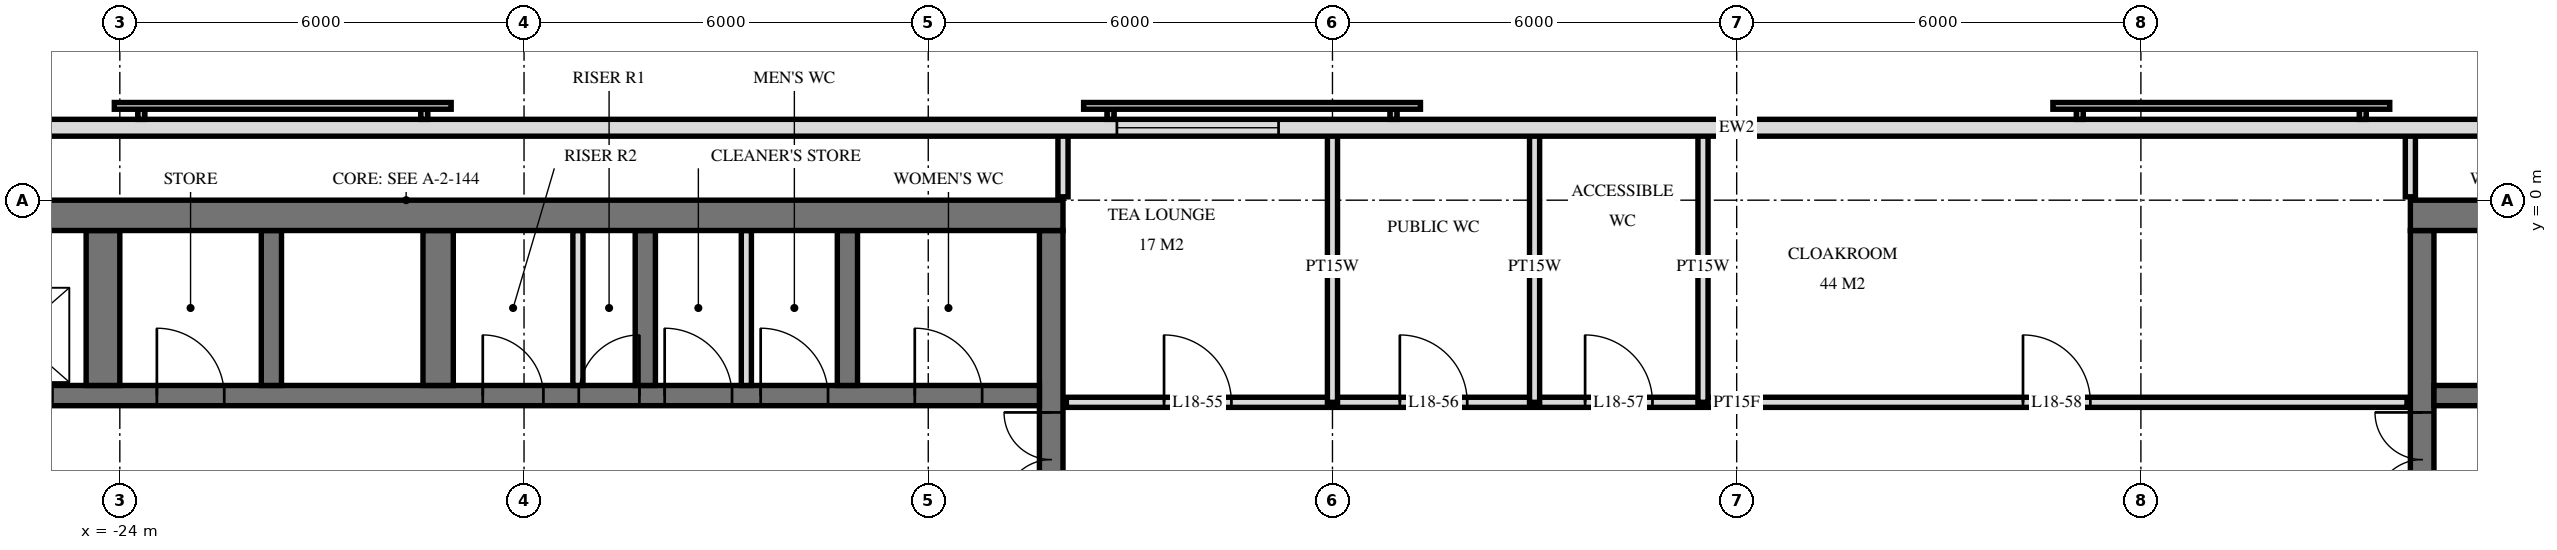
"""IFC4 building model, lengths in metres.
Left out: names, types, materials, properties, quantities, classifications, styles, units other than length and angle.
Written with IfcOpenShell. Run it as: python <this file> out.ifc"""

import sys

from ifc_helpers import new_model, si_unit, direction, frame, frame_2d, origin, place, context, subcontext, project, spatial, rectangle, extrude, element, fill, save


model = new_model("IFC4")
c1 = context("Model", 3, precision=1e-05, world=origin(), true_north=direction((0.0, 1.0)))
c2 = subcontext(c1, "Body", "Model", "MODEL_VIEW")
j1 = project(units=[si_unit("LENGTHUNIT", "METRE"), si_unit("PLANEANGLEUNIT", "RADIAN")], contexts=[c1])
p1 = place(None, origin())
s1 = spatial("IfcSite", under=j1, at=p1, CompositionType="ELEMENT")
p2 = place(p1, origin())
s2 = spatial("IfcBuilding", under=s1, at=p2, CompositionType="ELEMENT")
p3 = place(p2, frame((0.0, 0.0, 74.4)))
s3 = spatial("IfcBuildingStorey", under=s2, at=p3, CompositionType="ELEMENT", Elevation=74.4)
p4 = place(p3, frame((-29.5, -0.225, 0.0), z_axis=(0.0, 0.0, 1.0), x_axis=(1.0, 0.0, 0.0)))
e1 = element("IfcWall", 1, at=p4, inside=s3, PredefinedType="SHEAR", context=c2, shape_type="SweptSolid", body=[
    extrude(rectangle(XDim=19.5, YDim=0.45, at=frame_2d((9.75, 0.0))), origin(), (0.0, 0.0, 1.0), 3.6),
])
p5 = place(p3, frame((-10.175, -14.55, 0.0), z_axis=(0.0, 0.0, 1.0), x_axis=(0.0, 1.0, 0.0)))
e2 = element("IfcWall", 2, at=p5, inside=s3, PredefinedType="SHEAR", context=c2, shape_type="SweptSolid", body=[
    extrude(rectangle(XDim=14.1, YDim=0.35, at=frame_2d((7.05, 0.0))), origin(), (0.0, 0.0, 1.0), 3.6),
])
p6 = place(p5, frame((8.4, 0.0, 0.0)))
e3 = element("IfcOpeningElement", 3, at=p6, cuts=e2, PredefinedType="OPENING", context=c2, shape_type="SweptSolid", body=[
    extrude(rectangle(XDim=1.4, YDim=2.4, at=frame_2d((0.7, 1.2))), frame((0.0, 0.185, 0.0), z_axis=(0.0, -1.0, 0.0), x_axis=(1.0, 0.0, 0.0)), (0.0, 0.0, 1.0), 0.37),
])
p7 = place(p5, frame((10.0, 0.0, 0.0)))
e4 = element("IfcOpeningElement", 4, at=p7, cuts=e2, PredefinedType="OPENING", context=c2, shape_type="SweptSolid", body=[
    extrude(rectangle(XDim=1.4, YDim=2.4, at=frame_2d((0.7, 1.2))), frame((0.0, 0.185, 0.0), z_axis=(0.0, -1.0, 0.0), x_axis=(1.0, 0.0, 0.0)), (0.0, 0.0, 1.0), 0.37),
])
p8 = place(p5, frame((4.0, 0.0, 0.0)))
e5 = element("IfcOpeningElement", 5, at=p8, cuts=e2, PredefinedType="OPENING", context=c2, shape_type="SweptSolid", body=[
    extrude(rectangle(XDim=1.2, YDim=2.1, at=frame_2d((0.6, 1.05))), frame((0.0, 0.185, 0.0), z_axis=(0.0, -1.0, 0.0), x_axis=(1.0, 0.0, 0.0)), (0.0, 0.0, 1.0), 0.37),
])
p9 = place(p3, frame((-29.05, -2.9, 0.0), z_axis=(0.0, 0.0, 1.0), x_axis=(1.0, 0.0, 0.0)))
e6 = element("IfcWall", 6, at=p9, inside=s3, PredefinedType="SHEAR", context=c2, shape_type="SweptSolid", body=[
    extrude(rectangle(XDim=18.7, YDim=0.3, at=frame_2d((9.35, 0.0))), origin(), (0.0, 0.0, 1.0), 3.6),
])
p10 = place(p9, frame((2.95, 0.0, 0.0)))
e7 = element("IfcOpeningElement", 7, at=p10, cuts=e6, PredefinedType="OPENING", context=c2, shape_type="SweptSolid", body=[
    extrude(rectangle(XDim=1.1, YDim=2.1, at=frame_2d((0.55, 1.05))), frame((0.0, 0.16, 0.0), z_axis=(0.0, -1.0, 0.0), x_axis=(1.0, 0.0, 0.0)), (0.0, 0.0, 1.0), 0.32),
])
p11 = place(p9, frame((0.55, 0.0, 0.0)))
e8 = element("IfcOpeningElement", 8, at=p11, cuts=e6, PredefinedType="OPENING", context=c2, shape_type="SweptSolid", body=[
    extrude(rectangle(XDim=1.1, YDim=2.1, at=frame_2d((0.55, 1.05))), frame((0.0, 0.16, 0.0), z_axis=(0.0, -1.0, 0.0), x_axis=(1.0, 0.0, 0.0)), (0.0, 0.0, 1.0), 0.32),
])
p12 = place(p9, frame((11.863, 0.0, 0.0)))
e9 = element("IfcOpeningElement", 9, at=p12, cuts=e6, PredefinedType="OPENING", context=c2, shape_type="SweptSolid", body=[
    extrude(rectangle(XDim=0.9, YDim=2.1, at=frame_2d((0.45, 1.05))), frame((0.0, 0.16, 0.0), z_axis=(0.0, -1.0, 0.0), x_axis=(1.0, 0.0, 0.0)), (0.0, 0.0, 1.0), 0.32),
])
p13 = place(p9, frame((10.438, 0.0, 0.0)))
e10 = element("IfcOpeningElement", 10, at=p13, cuts=e6, PredefinedType="OPENING", context=c2, shape_type="SweptSolid", body=[
    extrude(rectangle(XDim=0.9, YDim=2.1, at=frame_2d((0.45, 1.05))), frame((0.0, 0.16, 0.0), z_axis=(0.0, -1.0, 0.0), x_axis=(1.0, 0.0, 0.0)), (0.0, 0.0, 1.0), 0.32),
])
p14 = place(p9, frame((16.85, 0.0, 0.0)))
e11 = element("IfcOpeningElement", 11, at=p14, cuts=e6, PredefinedType="OPENING", context=c2, shape_type="SweptSolid", body=[
    extrude(rectangle(XDim=1.0, YDim=2.1, at=frame_2d((0.5, 1.05))), frame((0.0, 0.16, 0.0), z_axis=(0.0, -1.0, 0.0), x_axis=(1.0, 0.0, 0.0)), (0.0, 0.0, 1.0), 0.32),
])
p15 = place(p9, frame((14.562, 0.0, 0.0)))
e12 = element("IfcOpeningElement", 12, at=p15, cuts=e6, PredefinedType="OPENING", context=c2, shape_type="SweptSolid", body=[
    extrude(rectangle(XDim=1.0, YDim=2.1, at=frame_2d((0.5, 1.05))), frame((0.0, 0.16, 0.0), z_axis=(0.0, -1.0, 0.0), x_axis=(1.0, 0.0, 0.0)), (0.0, 0.0, 1.0), 0.32),
])
p16 = place(p9, frame((13.137, 0.0, 0.0)))
e13 = element("IfcOpeningElement", 13, at=p16, cuts=e6, PredefinedType="OPENING", context=c2, shape_type="SweptSolid", body=[
    extrude(rectangle(XDim=1.0, YDim=2.1, at=frame_2d((0.5, 1.05))), frame((0.0, 0.16, 0.0), z_axis=(0.0, -1.0, 0.0), x_axis=(1.0, 0.0, 0.0)), (0.0, 0.0, 1.0), 0.32),
])
p17 = place(p9, frame((5.6, 0.0, 0.0)))
e14 = element("IfcOpeningElement", 14, at=p17, cuts=e6, PredefinedType="OPENING", context=c2, shape_type="SweptSolid", body=[
    extrude(rectangle(XDim=1.0, YDim=2.1, at=frame_2d((0.5, 1.05))), frame((0.0, 0.16, 0.0), z_axis=(0.0, -1.0, 0.0), x_axis=(1.0, 0.0, 0.0)), (0.0, 0.0, 1.0), 0.32),
])
for number, where, z_axis, x_axis in (
    (15, (-13.2, -2.75, 0.0), (0.0, 0.0, 1.0), (0.0, 1.0, 0.0)),
    (16, (-16.2, -2.75, 0.0), (0.0, 0.0, 1.0), (0.0, 1.0, 0.0)),
):
    element("IfcWall", number, at=place(p3, frame(where, z_axis=z_axis, x_axis=x_axis)), inside=s3, PredefinedType="SHEAR", context=c2, shape_type="SweptSolid", body=[
        extrude(rectangle(XDim=2.3, YDim=0.3, at=frame_2d((1.15, 0.0))), origin(), (0.0, 0.0, 1.0), 3.6),
    ])
p18 = place(p3, frame((-19.275, -2.75, 0.0), z_axis=(0.0, 0.0, 1.0), x_axis=(0.0, 1.0, 0.0)))
e17 = element("IfcWall", 17, at=p18, inside=s3, PredefinedType="SHEAR", context=c2, shape_type="SweptSolid", body=[
    extrude(rectangle(XDim=2.3, YDim=0.45, at=frame_2d((1.15, 0.0))), origin(), (0.0, 0.0, 1.0), 3.6),
])
p19 = place(p3, frame((-21.75, -2.75, 0.0), z_axis=(0.0, 0.0, 1.0), x_axis=(0.0, 1.0, 0.0)))
e18 = element("IfcWall", 18, at=p19, inside=s3, PredefinedType="SHEAR", context=c2, shape_type="SweptSolid", body=[
    extrude(rectangle(XDim=2.3, YDim=0.3, at=frame_2d((1.15, 0.0))), origin(), (0.0, 0.0, 1.0), 3.6),
])
p20 = place(p3, frame((-24.25, -2.75, 0.0), z_axis=(0.0, 0.0, 1.0), x_axis=(0.0, 1.0, 0.0)))
e19 = element("IfcWall", 19, at=p20, inside=s3, PredefinedType="SHEAR", context=c2, shape_type="SweptSolid", body=[
    extrude(rectangle(XDim=2.3, YDim=0.5, at=frame_2d((1.15, 0.0))), origin(), (0.0, 0.0, 1.0), 3.6),
])
p21 = place(p3, frame((10.0, -0.225, 0.0), z_axis=(0.0, 0.0, 1.0), x_axis=(1.0, 0.0, 0.0)))
e20 = element("IfcWall", 20, at=p21, inside=s3, PredefinedType="SHEAR", context=c2, shape_type="SweptSolid", body=[
    extrude(rectangle(XDim=19.5, YDim=0.45, at=frame_2d((9.75, 0.0))), origin(), (0.0, 0.0, 1.0), 3.6),
])
p22 = place(p3, frame((10.175, -14.55, 0.0), z_axis=(0.0, 0.0, 1.0), x_axis=(0.0, 1.0, 0.0)))
e21 = element("IfcWall", 21, at=p22, inside=s3, PredefinedType="SHEAR", context=c2, shape_type="SweptSolid", body=[
    extrude(rectangle(XDim=14.1, YDim=0.35, at=frame_2d((7.05, 0.0))), origin(), (0.0, 0.0, 1.0), 3.6),
])
p23 = place(p22, frame((8.4, 0.0, 0.0)))
e22 = element("IfcOpeningElement", 22, at=p23, cuts=e21, PredefinedType="OPENING", context=c2, shape_type="SweptSolid", body=[
    extrude(rectangle(XDim=1.4, YDim=2.4, at=frame_2d((0.7, 1.2))), frame((0.0, 0.185, 0.0), z_axis=(0.0, -1.0, 0.0), x_axis=(1.0, 0.0, 0.0)), (0.0, 0.0, 1.0), 0.37),
])
p24 = place(p22, frame((10.0, 0.0, 0.0)))
e23 = element("IfcOpeningElement", 23, at=p24, cuts=e21, PredefinedType="OPENING", context=c2, shape_type="SweptSolid", body=[
    extrude(rectangle(XDim=1.4, YDim=2.4, at=frame_2d((0.7, 1.2))), frame((0.0, 0.185, 0.0), z_axis=(0.0, -1.0, 0.0), x_axis=(1.0, 0.0, 0.0)), (0.0, 0.0, 1.0), 0.37),
])
p25 = place(p22, frame((4.0, 0.0, 0.0)))
e24 = element("IfcOpeningElement", 24, at=p25, cuts=e21, PredefinedType="OPENING", context=c2, shape_type="SweptSolid", body=[
    extrude(rectangle(XDim=1.2, YDim=2.1, at=frame_2d((0.6, 1.05))), frame((0.0, 0.185, 0.0), z_axis=(0.0, -1.0, 0.0), x_axis=(1.0, 0.0, 0.0)), (0.0, 0.0, 1.0), 0.37),
])
p26 = place(p3, frame((10.35, -2.9, 0.0), z_axis=(0.0, 0.0, 1.0), x_axis=(1.0, 0.0, 0.0)))
e25 = element("IfcWall", 25, at=p26, inside=s3, PredefinedType="SHEAR", context=c2, shape_type="SweptSolid", body=[
    extrude(rectangle(XDim=18.7, YDim=0.3, at=frame_2d((9.35, 0.0))), origin(), (0.0, 0.0, 1.0), 3.6),
])
p27 = place(p26, frame((14.65, 0.0, 0.0)))
e26 = element("IfcOpeningElement", 26, at=p27, cuts=e25, PredefinedType="OPENING", context=c2, shape_type="SweptSolid", body=[
    extrude(rectangle(XDim=1.1, YDim=2.1, at=frame_2d((0.55, 1.05))), frame((0.0, 0.16, 0.0), z_axis=(0.0, -1.0, 0.0), x_axis=(1.0, 0.0, 0.0)), (0.0, 0.0, 1.0), 0.32),
])
p28 = place(p26, frame((17.05, 0.0, 0.0)))
e27 = element("IfcOpeningElement", 27, at=p28, cuts=e25, PredefinedType="OPENING", context=c2, shape_type="SweptSolid", body=[
    extrude(rectangle(XDim=1.1, YDim=2.1, at=frame_2d((0.55, 1.05))), frame((0.0, 0.16, 0.0), z_axis=(0.0, -1.0, 0.0), x_axis=(1.0, 0.0, 0.0)), (0.0, 0.0, 1.0), 0.32),
])
p29 = place(p26, frame((5.938, 0.0, 0.0)))
e28 = element("IfcOpeningElement", 28, at=p29, cuts=e25, PredefinedType="OPENING", context=c2, shape_type="SweptSolid", body=[
    extrude(rectangle(XDim=0.9, YDim=2.1, at=frame_2d((0.45, 1.05))), frame((0.0, 0.16, 0.0), z_axis=(0.0, -1.0, 0.0), x_axis=(1.0, 0.0, 0.0)), (0.0, 0.0, 1.0), 0.32),
])
p30 = place(p26, frame((7.363, 0.0, 0.0)))
e29 = element("IfcOpeningElement", 29, at=p30, cuts=e25, PredefinedType="OPENING", context=c2, shape_type="SweptSolid", body=[
    extrude(rectangle(XDim=0.9, YDim=2.1, at=frame_2d((0.45, 1.05))), frame((0.0, 0.16, 0.0), z_axis=(0.0, -1.0, 0.0), x_axis=(1.0, 0.0, 0.0)), (0.0, 0.0, 1.0), 0.32),
])
p31 = place(p26, frame((0.85, 0.0, 0.0)))
e30 = element("IfcOpeningElement", 30, at=p31, cuts=e25, PredefinedType="OPENING", context=c2, shape_type="SweptSolid", body=[
    extrude(rectangle(XDim=1.0, YDim=2.1, at=frame_2d((0.5, 1.05))), frame((0.0, 0.16, 0.0), z_axis=(0.0, -1.0, 0.0), x_axis=(1.0, 0.0, 0.0)), (0.0, 0.0, 1.0), 0.32),
])
p32 = place(p26, frame((3.137, 0.0, 0.0)))
e31 = element("IfcOpeningElement", 31, at=p32, cuts=e25, PredefinedType="OPENING", context=c2, shape_type="SweptSolid", body=[
    extrude(rectangle(XDim=1.0, YDim=2.1, at=frame_2d((0.5, 1.05))), frame((0.0, 0.16, 0.0), z_axis=(0.0, -1.0, 0.0), x_axis=(1.0, 0.0, 0.0)), (0.0, 0.0, 1.0), 0.32),
])
p33 = place(p26, frame((4.562, 0.0, 0.0)))
e32 = element("IfcOpeningElement", 32, at=p33, cuts=e25, PredefinedType="OPENING", context=c2, shape_type="SweptSolid", body=[
    extrude(rectangle(XDim=1.0, YDim=2.1, at=frame_2d((0.5, 1.05))), frame((0.0, 0.16, 0.0), z_axis=(0.0, -1.0, 0.0), x_axis=(1.0, 0.0, 0.0)), (0.0, 0.0, 1.0), 0.32),
])
p34 = place(p26, frame((12.1, 0.0, 0.0)))
e33 = element("IfcOpeningElement", 33, at=p34, cuts=e25, PredefinedType="OPENING", context=c2, shape_type="SweptSolid", body=[
    extrude(rectangle(XDim=1.0, YDim=2.1, at=frame_2d((0.5, 1.05))), frame((0.0, 0.16, 0.0), z_axis=(0.0, -1.0, 0.0), x_axis=(1.0, 0.0, 0.0)), (0.0, 0.0, 1.0), 0.32),
])
p35 = place(p3, frame((28.775, 1.075, 0.0), z_axis=(0.0, 0.0, 1.0), x_axis=(-1.0, 0.0, 0.0)))
e34 = element("IfcWall", 34, at=p35, inside=s3, PredefinedType="SOLIDWALL", context=c2, shape_type="SweptSolid", body=[
    extrude(rectangle(XDim=57.551, YDim=0.25, at=frame_2d((28.775, 0.0))), origin(), (0.0, 0.0, 1.0), 3.32),
])
p36 = place(p35, frame((35.575, 0.0, 0.3)))
e35 = element("IfcOpeningElement", 35, at=p36, cuts=e34, PredefinedType="OPENING", context=c2, shape_type="SweptSolid", body=[
    extrude(rectangle(XDim=2.4, YDim=2.1, at=frame_2d((1.2, 1.05))), frame((0.0, 0.135, 0.0), z_axis=(0.0, -1.0, 0.0), x_axis=(1.0, 0.0, 0.0)), (0.0, 0.0, 1.0), 0.27),
])
for number, where, z_axis, x_axis in (
    (36, (-17.2, -2.75, 0.0), (0.0, 0.0, 1.0), (0.0, 1.0, 0.0)),
    (37, (-14.7, -2.75, 0.0), (0.0, 0.0, 1.0), (0.0, 1.0, 0.0)),
):
    element("IfcWall", number, at=place(p3, frame(where, z_axis=z_axis, x_axis=x_axis)), inside=s3, PredefinedType="PARTITIONING", context=c2, shape_type="SweptSolid", body=[
        extrude(rectangle(XDim=2.3, YDim=0.15, at=frame_2d((1.15, 0.0))), origin(), (0.0, 0.0, 1.0), 3.3),
    ])
p37 = place(p3, frame((10.0, 0.05, 0.0), z_axis=(0.0, 0.0, 1.0), x_axis=(0.0, 1.0, 0.0)))
e38 = element("IfcWall", 38, at=p37, inside=s3, PredefinedType="PARTITIONING", context=c2, shape_type="SweptSolid", body=[
    extrude(rectangle(XDim=0.97, YDim=0.15, at=frame_2d((0.485, 0.0))), origin(), (0.0, 0.0, 1.0), 3.32),
])
for number, where, z_axis, x_axis in (
    (39, (-0.5, -3.0, 0.0), (0.0, 0.0, 1.0), (0.0, 1.0, 0.0)),
    (40, (-3.0, -3.0, 0.0), (0.0, 0.0, 1.0), (0.0, 1.0, 0.0)),
    (41, (-6.0, -3.0, 0.0), (0.0, 0.0, 1.0), (0.0, 1.0, 0.0)),
):
    element("IfcWall", number, at=place(p3, frame(where, z_axis=z_axis, x_axis=x_axis)), inside=s3, PredefinedType="PLUMBINGWALL", context=c2, shape_type="SweptSolid", body=[
        extrude(rectangle(XDim=4.02, YDim=0.15, at=frame_2d((2.01, 0.0))), origin(), (0.0, 0.0, 1.0), 3.32),
    ])
p38 = place(p3, frame((-10.0, 0.05, 0.0), z_axis=(0.0, 0.0, 1.0), x_axis=(0.0, 1.0, 0.0)))
e42 = element("IfcWall", 42, at=p38, inside=s3, PredefinedType="PARTITIONING", context=c2, shape_type="SweptSolid", body=[
    extrude(rectangle(XDim=0.97, YDim=0.15, at=frame_2d((0.485, 0.0))), origin(), (0.0, 0.0, 1.0), 3.32),
])
p39 = place(p3, frame((-9.95, -3.0, 0.0), z_axis=(0.0, 0.0, 1.0), x_axis=(1.0, 0.0, 0.0)))
e43 = element("IfcWall", 43, at=p39, inside=s3, PredefinedType="PARTITIONING", context=c2, shape_type="SweptSolid", body=[
    extrude(rectangle(XDim=19.9, YDim=0.15, at=frame_2d((9.95, 0.0))), origin(), (0.0, 0.0, 1.0), 3.32),
])
p40 = place(p39, frame((1.45, 0.0, 0.0)))
e44 = element("IfcOpeningElement", 44, at=p40, cuts=e43, PredefinedType="OPENING", context=c2, shape_type="SweptSolid", body=[
    extrude(rectangle(XDim=1.0, YDim=2.1, at=frame_2d((0.5, 1.05))), frame((0.0, 0.085, 0.0), z_axis=(0.0, -1.0, 0.0), x_axis=(1.0, 0.0, 0.0)), (0.0, 0.0, 1.0), 0.17),
])
p41 = place(p39, frame((4.95, 0.0, 0.0)))
e45 = element("IfcOpeningElement", 45, at=p41, cuts=e43, PredefinedType="OPENING", context=c2, shape_type="SweptSolid", body=[
    extrude(rectangle(XDim=1.0, YDim=2.1, at=frame_2d((0.5, 1.05))), frame((0.0, 0.085, 0.0), z_axis=(0.0, -1.0, 0.0), x_axis=(1.0, 0.0, 0.0)), (0.0, 0.0, 1.0), 0.17),
])
p42 = place(p39, frame((7.7, 0.0, 0.0)))
e46 = element("IfcOpeningElement", 46, at=p42, cuts=e43, PredefinedType="OPENING", context=c2, shape_type="SweptSolid", body=[
    extrude(rectangle(XDim=1.0, YDim=2.1, at=frame_2d((0.5, 1.05))), frame((0.0, 0.085, 0.0), z_axis=(0.0, -1.0, 0.0), x_axis=(1.0, 0.0, 0.0)), (0.0, 0.0, 1.0), 0.17),
])
p43 = place(p39, frame((14.2, 0.0, 0.0)))
e47 = element("IfcOpeningElement", 47, at=p43, cuts=e43, PredefinedType="OPENING", context=c2, shape_type="SweptSolid", body=[
    extrude(rectangle(XDim=1.0, YDim=2.1, at=frame_2d((0.5, 1.05))), frame((0.0, 0.085, 0.0), z_axis=(0.0, -1.0, 0.0), x_axis=(1.0, 0.0, 0.0)), (0.0, 0.0, 1.0), 0.17),
])
p44 = place(p36, origin())
e48 = element("IfcWindow", 48, at=p44, inside=s3, PartitioningType="SINGLE_PANEL", PredefinedType="WINDOW", context=c2, shape_type="SweptSolid", body=[
    extrude(rectangle(XDim=2.4, YDim=2.1, at=frame_2d((1.2, 1.05))), frame((0.0, 0.03, 0.0), z_axis=(0.0, -1.0, 0.0), x_axis=(1.0, 0.0, 0.0)), (0.0, 0.0, 1.0), 0.06),
])
fill(e35, e48)
p45 = place(p7, origin())
e49 = element("IfcDoor", 49, at=p45, inside=s3, OperationType="DOUBLE_DOOR_SINGLE_SWING", PredefinedType="DOOR", context=c2, shape_type="SweptSolid", body=[
    extrude(rectangle(XDim=1.4, YDim=2.4, at=frame_2d((0.7, 1.2))), frame((0.0, 0.025, 0.0), z_axis=(0.0, -1.0, 0.0), x_axis=(1.0, 0.0, 0.0)), (0.0, 0.0, 1.0), 0.05),
])
fill(e4, e49)
p46 = place(p12, origin())
e50 = element("IfcDoor", 50, at=p46, inside=s3, OperationType="SINGLE_SWING_LEFT", PredefinedType="DOOR", context=c2, shape_type="SweptSolid", body=[
    extrude(rectangle(XDim=0.9, YDim=2.1, at=frame_2d((0.45, 1.05))), frame((0.0, 0.025, 0.0), z_axis=(0.0, -1.0, 0.0), x_axis=(1.0, 0.0, 0.0)), (0.0, 0.0, 1.0), 0.05),
])
fill(e9, e50)
p47 = place(p13, origin())
e51 = element("IfcDoor", 51, at=p47, inside=s3, OperationType="SINGLE_SWING_RIGHT", PredefinedType="DOOR", context=c2, shape_type="SweptSolid", body=[
    extrude(rectangle(XDim=0.9, YDim=2.1, at=frame_2d((0.45, 1.05))), frame((0.0, 0.025, 0.0), z_axis=(0.0, -1.0, 0.0), x_axis=(1.0, 0.0, 0.0)), (0.0, 0.0, 1.0), 0.05),
])
fill(e10, e51)
p48 = place(p14, origin())
e52 = element("IfcDoor", 52, at=p48, inside=s3, OperationType="SINGLE_SWING_RIGHT", PredefinedType="DOOR", context=c2, shape_type="SweptSolid", body=[
    extrude(rectangle(XDim=1.0, YDim=2.1, at=frame_2d((0.5, 1.05))), frame((0.0, 0.025, 0.0), z_axis=(0.0, -1.0, 0.0), x_axis=(1.0, 0.0, 0.0)), (0.0, 0.0, 1.0), 0.05),
])
fill(e11, e52)
p49 = place(p15, origin())
e53 = element("IfcDoor", 53, at=p49, inside=s3, OperationType="SINGLE_SWING_RIGHT", PredefinedType="DOOR", context=c2, shape_type="SweptSolid", body=[
    extrude(rectangle(XDim=1.0, YDim=2.1, at=frame_2d((0.5, 1.05))), frame((0.0, 0.025, 0.0), z_axis=(0.0, -1.0, 0.0), x_axis=(1.0, 0.0, 0.0)), (0.0, 0.0, 1.0), 0.05),
])
fill(e12, e53)
p50 = place(p16, origin())
e54 = element("IfcDoor", 54, at=p50, inside=s3, OperationType="SINGLE_SWING_RIGHT", PredefinedType="DOOR", context=c2, shape_type="SweptSolid", body=[
    extrude(rectangle(XDim=1.0, YDim=2.1, at=frame_2d((0.5, 1.05))), frame((0.0, 0.025, 0.0), z_axis=(0.0, -1.0, 0.0), x_axis=(1.0, 0.0, 0.0)), (0.0, 0.0, 1.0), 0.05),
])
fill(e13, e54)
p51 = place(p17, origin())
e55 = element("IfcDoor", 55, at=p51, inside=s3, OperationType="SINGLE_SWING_RIGHT", PredefinedType="DOOR", context=c2, shape_type="SweptSolid", body=[
    extrude(rectangle(XDim=1.0, YDim=2.1, at=frame_2d((0.5, 1.05))), frame((0.0, 0.025, 0.0), z_axis=(0.0, -1.0, 0.0), x_axis=(1.0, 0.0, 0.0)), (0.0, 0.0, 1.0), 0.05),
])
fill(e14, e55)
p52 = place(p24, origin())
e56 = element("IfcDoor", 56, at=p52, inside=s3, OperationType="DOUBLE_DOOR_SINGLE_SWING", PredefinedType="DOOR", context=c2, shape_type="SweptSolid", body=[
    extrude(rectangle(XDim=1.4, YDim=2.4, at=frame_2d((0.7, 1.2))), frame((0.0, 0.025, 0.0), z_axis=(0.0, -1.0, 0.0), x_axis=(1.0, 0.0, 0.0)), (0.0, 0.0, 1.0), 0.05),
])
fill(e23, e56)
p53 = place(p40, origin())
e57 = element("IfcDoor", 57, at=p53, inside=s3, OperationType="SINGLE_SWING_RIGHT", PredefinedType="DOOR", context=c2, shape_type="SweptSolid", body=[
    extrude(rectangle(XDim=1.0, YDim=2.1, at=frame_2d((0.5, 1.05))), frame((0.0, 0.025, 0.0), z_axis=(0.0, -1.0, 0.0), x_axis=(1.0, 0.0, 0.0)), (0.0, 0.0, 1.0), 0.05),
])
fill(e44, e57)
p54 = place(p41, origin())
e58 = element("IfcDoor", 58, at=p54, inside=s3, OperationType="SINGLE_SWING_RIGHT", PredefinedType="DOOR", context=c2, shape_type="SweptSolid", body=[
    extrude(rectangle(XDim=1.0, YDim=2.1, at=frame_2d((0.5, 1.05))), frame((0.0, 0.025, 0.0), z_axis=(0.0, -1.0, 0.0), x_axis=(1.0, 0.0, 0.0)), (0.0, 0.0, 1.0), 0.05),
])
fill(e45, e58)
p55 = place(p42, origin())
e59 = element("IfcDoor", 59, at=p55, inside=s3, OperationType="SINGLE_SWING_RIGHT", PredefinedType="DOOR", context=c2, shape_type="SweptSolid", body=[
    extrude(rectangle(XDim=1.0, YDim=2.1, at=frame_2d((0.5, 1.05))), frame((0.0, 0.025, 0.0), z_axis=(0.0, -1.0, 0.0), x_axis=(1.0, 0.0, 0.0)), (0.0, 0.0, 1.0), 0.05),
])
fill(e46, e59)
p56 = place(p43, origin())
e60 = element("IfcDoor", 60, at=p56, inside=s3, OperationType="SINGLE_SWING_RIGHT", PredefinedType="DOOR", context=c2, shape_type="SweptSolid", body=[
    extrude(rectangle(XDim=1.0, YDim=2.1, at=frame_2d((0.5, 1.05))), frame((0.0, 0.025, 0.0), z_axis=(0.0, -1.0, 0.0), x_axis=(1.0, 0.0, 0.0)), (0.0, 0.0, 1.0), 0.05),
])
fill(e47, e60)
save(model, sys.argv[1])
